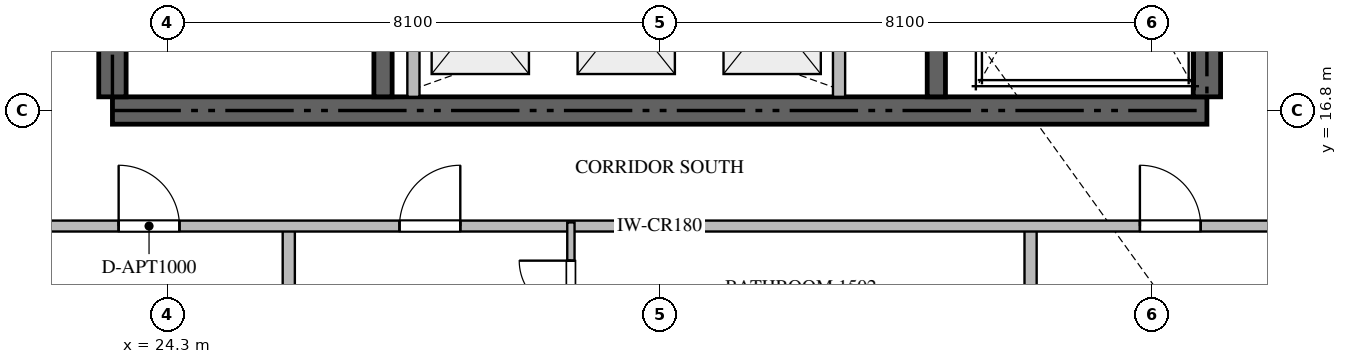
"""IFC4 building model, lengths in metres.
Left out: names, types, materials, properties, quantities, classifications, styles, units other than length and angle.
Written with IfcOpenShell. Run it as: python <this file> out.ifc"""

import sys

from ifc_helpers import new_model, si_unit, direction, frame, frame_2d, origin, place, context, subcontext, project, spatial, rectangle, extrude, source, transform, mapped, element, fill, save


model = new_model("IFC4")
c1 = context("Model", 3, precision=1e-05, world=origin(), true_north=direction((0.0, 1.0)))
c2 = subcontext(c1, "Body", "Model", "MODEL_VIEW")
j1 = project(units=[si_unit("LENGTHUNIT", "METRE"), si_unit("PLANEANGLEUNIT", "RADIAN")], contexts=[c1])
p1 = place(None, origin())
s1 = spatial("IfcSite", under=j1, at=p1, CompositionType="ELEMENT")
p2 = place(p1, origin())
s2 = spatial("IfcBuilding", under=s1, at=p2, CompositionType="ELEMENT")
p3 = place(p2, frame((0.0, 0.0, 64.2)))
s3 = spatial("IfcBuildingStorey", under=s2, at=p3, CompositionType="ELEMENT", Elevation=64.2)
p4 = place(p3, frame((23.4, 16.8, -0.26), z_axis=(0.0, 0.0, 1.0), x_axis=(1.0, 0.0, 0.0)))
e1 = element("IfcWall", 1, at=p4, inside=s3, PredefinedType="SHEAR", context=c2, shape_type="SweptSolid", body=[
    extrude(rectangle(XDim=18.0, YDim=0.45, at=frame_2d((9.0, 0.0))), origin(), (0.0, 0.0, 1.0), 3.748),
])
p5 = place(p3, frame((23.4, 17.025, -0.26), z_axis=(0.0, 0.0, 1.0), x_axis=(0.0, 1.0, 0.0)))
e2 = element("IfcWall", 2, at=p5, inside=s3, PredefinedType="SHEAR", context=c2, shape_type="SweptSolid", body=[
    extrude(rectangle(XDim=4.825, YDim=0.45, at=frame_2d((2.413, 0.0))), origin(), (0.0, 0.0, 1.0), 3.748),
])
p6 = place(p3, frame((41.4, 17.025, -0.26), z_axis=(0.0, 0.0, 1.0), x_axis=(0.0, 1.0, 0.0)))
e3 = element("IfcWall", 3, at=p6, inside=s3, PredefinedType="SHEAR", context=c2, shape_type="SweptSolid", body=[
    extrude(rectangle(XDim=8.325, YDim=0.45, at=frame_2d((4.163, 0.0))), origin(), (0.0, 0.0, 1.0), 3.748),
])
p7 = place(p3, frame((27.85, 17.025, -0.26), z_axis=(0.0, 0.0, 1.0), x_axis=(0.0, 1.0, 0.0)))
e4 = element("IfcWall", 4, at=p7, inside=s3, PredefinedType="SHEAR", context=c2, shape_type="SweptSolid", body=[
    extrude(rectangle(XDim=4.825, YDim=0.3, at=frame_2d((2.413, 0.0))), origin(), (0.0, 0.0, 1.0), 3.748),
])
p8 = place(p3, frame((36.95, 17.025, -0.26), z_axis=(0.0, 0.0, 1.0), x_axis=(0.0, 1.0, 0.0)))
e5 = element("IfcWall", 5, at=p8, inside=s3, PredefinedType="SHEAR", context=c2, shape_type="SweptSolid", body=[
    extrude(rectangle(XDim=8.325, YDim=0.3, at=frame_2d((4.163, 0.0))), origin(), (0.0, 0.0, 1.0), 3.748),
])
for number, where, z_axis, x_axis in (
    (6, (28.35, 17.025, 0.0), (0.0, 0.0, 1.0), (0.0, 1.0, 0.0)),
    (7, (35.35, 17.025, 0.0), (0.0, 0.0, 1.0), (0.0, 1.0, 0.0)),
):
    element("IfcWall", number, at=place(p3, frame(where, z_axis=z_axis, x_axis=x_axis)), inside=s3, PredefinedType="STANDARD", context=c2, shape_type="SweptSolid", body=[
        extrude(rectangle(XDim=2.525, YDim=0.2, at=frame_2d((1.263, 0.0))), origin(), (0.0, 0.0, 1.0), 3.49),
    ])
for number, where, z_axis, x_axis in (
    (8, (26.3, 0.282, 0.0), (0.0, 0.0, 1.0), (0.0, 1.0, 0.0)),
    (9, (38.5, 0.282, 0.0), (0.0, 0.0, 1.0), (0.0, 1.0, 0.0)),
):
    element("IfcWall", number, at=place(p3, frame(where, z_axis=z_axis, x_axis=x_axis)), inside=s3, PredefinedType="PARTITIONING", context=c2, shape_type="SweptSolid", body=[
        extrude(rectangle(XDim=14.618, YDim=0.2, at=frame_2d((7.309, 0.0))), origin(), (0.0, 0.0, 1.0), 3.49),
    ])
p9 = place(p3, frame((21.402, 14.9, 0.0), z_axis=(0.0, 0.0, 1.0), x_axis=(1.0, 0.0, 0.0)))
e10 = element("IfcWall", 10, at=p9, inside=s3, PredefinedType="PARTITIONING", context=c2, shape_type="SweptSolid", body=[
    extrude(rectangle(XDim=21.996, YDim=0.18, at=frame_2d((10.998, 0.0))), origin(), (0.0, 0.0, 1.0), 3.49),
])
p10 = place(p9, frame((2.1, 0.0, 0.0)))
e11 = element("IfcOpeningElement", 11, at=p10, cuts=e10, PredefinedType="OPENING", context=c2, shape_type="SweptSolid", body=[
    extrude(rectangle(XDim=1.0, YDim=2.15, at=frame_2d((0.5, 1.075))), frame((0.0, 0.1, 0.0), z_axis=(0.0, -1.0, 0.0), x_axis=(1.0, 0.0, 0.0)), (0.0, 0.0, 1.0), 0.2),
])
p11 = place(p9, frame((6.719, 0.0, 0.0)))
e12 = element("IfcOpeningElement", 12, at=p11, cuts=e10, PredefinedType="OPENING", context=c2, shape_type="SweptSolid", body=[
    extrude(rectangle(XDim=1.0, YDim=2.15, at=frame_2d((0.5, 1.075))), frame((0.0, 0.1, 0.0), z_axis=(0.0, -1.0, 0.0), x_axis=(1.0, 0.0, 0.0)), (0.0, 0.0, 1.0), 0.2),
])
p12 = place(p9, frame((18.896, 0.0, 0.0)))
e13 = element("IfcOpeningElement", 13, at=p12, cuts=e10, PredefinedType="OPENING", context=c2, shape_type="SweptSolid", body=[
    extrude(rectangle(XDim=1.0, YDim=2.15, at=frame_2d((0.5, 1.075))), frame((0.0, 0.1, 0.0), z_axis=(0.0, -1.0, 0.0), x_axis=(1.0, 0.0, 0.0)), (0.0, 0.0, 1.0), 0.2),
])
p13 = place(p3, frame((30.94, 12.852, 0.0), z_axis=(0.0, 0.0, 1.0), x_axis=(0.0, 1.0, 0.0)))
e14 = element("IfcWall", 14, at=p13, inside=s3, PredefinedType="PARTITIONING", context=c2, shape_type="SweptSolid", body=[
    extrude(rectangle(XDim=2.108, YDim=0.12, at=frame_2d((1.054, 0.0))), origin(), (0.0, 0.0, 1.0), 3.49),
])
p14 = place(p13, frame((0.629, 0.0, 0.0)))
e15 = element("IfcOpeningElement", 15, at=p14, cuts=e14, PredefinedType="OPENING", context=c2, shape_type="SweptSolid", body=[
    extrude(rectangle(XDim=0.85, YDim=2.1, at=frame_2d((0.425, 1.05))), frame((0.0, 0.07, 0.0), z_axis=(0.0, -1.0, 0.0), x_axis=(1.0, 0.0, 0.0)), (0.0, 0.0, 1.0), 0.14),
])
m1 = source(origin(), c2, "Body", "SweptSolid", [
    extrude(rectangle(XDim=1.0, YDim=2.15, at=frame_2d((0.5, 1.075))), frame((0.0, 0.025, 0.0), z_axis=(0.0, -1.0, 0.0), x_axis=(1.0, 0.0, 0.0)), (0.0, 0.0, 1.0), 0.05),
])
p15 = place(p10, origin())
e16 = element("IfcDoor", 16, at=p15, inside=s3, OperationType="SINGLE_SWING_LEFT", PredefinedType="DOOR", context=c2, shape_type="MappedRepresentation", body=[
    mapped(m1, transform((0.0, 0.0, 0.0), scale=1.0)),
])
fill(e11, e16)
p16 = place(p11, origin())
e17 = element("IfcDoor", 17, at=p16, inside=s3, OperationType="SINGLE_SWING_RIGHT", PredefinedType="DOOR", context=c2, shape_type="MappedRepresentation", body=[
    mapped(m1, transform((0.0, 0.0, 0.0), scale=1.0)),
])
fill(e12, e17)
p17 = place(p12, origin())
e18 = element("IfcDoor", 18, at=p17, inside=s3, OperationType="SINGLE_SWING_LEFT", PredefinedType="DOOR", context=c2, shape_type="MappedRepresentation", body=[
    mapped(m1, transform((0.0, 0.0, 0.0), scale=1.0)),
])
fill(e13, e18)
m2 = source(origin(), c2, "Body", "SweptSolid", [
    extrude(rectangle(XDim=0.85, YDim=2.1, at=frame_2d((0.425, 1.05))), frame((0.0, 0.025, 0.0), z_axis=(0.0, -1.0, 0.0), x_axis=(1.0, 0.0, 0.0)), (0.0, 0.0, 1.0), 0.05),
])
p18 = place(p14, origin())
e19 = element("IfcDoor", 19, at=p18, inside=s3, OperationType="SINGLE_SWING_RIGHT", PredefinedType="DOOR", context=c2, shape_type="MappedRepresentation", body=[
    mapped(m2, transform((0.0, 0.0, 0.0), scale=1.0)),
])
fill(e15, e19)
save(model, sys.argv[1])
